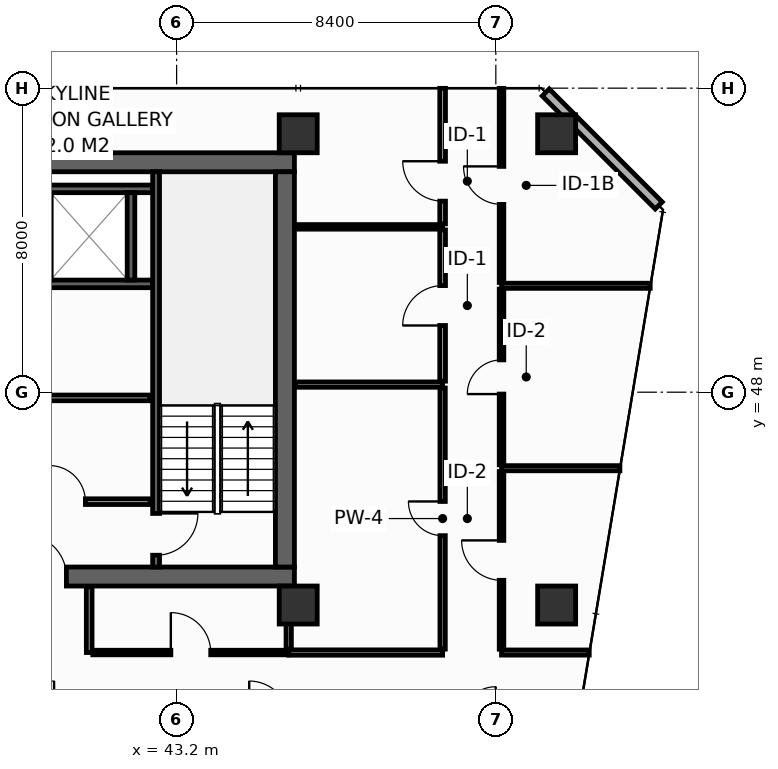
"""IFC4 building model, lengths in metres.
Left out: names, types, materials, properties, quantities, classifications, styles, units other than length and angle.
Written with IfcOpenShell. Run it as: python <this file> out.ifc"""

import sys

from ifc_helpers import new_model, si_unit, direction, frame, frame_2d, origin, origin_2d, place, context, subcontext, project, spatial, rectangle, hollow_rectangle, extrude, element, fill, save


model = new_model("IFC4")
c1 = context("Model", 3, precision=1e-05, world=origin(), true_north=direction((0.0, 1.0)))
c2 = subcontext(c1, "Body", "Model", "MODEL_VIEW")
j1 = project(units=[si_unit("LENGTHUNIT", "METRE"), si_unit("PLANEANGLEUNIT", "RADIAN")], contexts=[c1])
p1 = place(None, origin())
s1 = spatial("IfcSite", under=j1, at=p1, CompositionType="ELEMENT")
p2 = place(p1, origin())
s2 = spatial("IfcBuilding", under=s1, at=p2, CompositionType="ELEMENT")
p3 = place(p2, frame((0.0, 0.0, 156.2)))
s3 = spatial("IfcBuildingStorey", under=s2, at=p3, CompositionType="ELEMENT", Elevation=156.2)
p4 = place(p3, frame((13.6, 43.15, 0.0), z_axis=(0.0, 0.0, 1.0), x_axis=(1.0, 0.0, 0.0)))
e1 = element("IfcWall", 1, at=p4, inside=s3, PredefinedType="SHEAR", context=c2, shape_type="SweptSolid", body=[
    extrude(rectangle(XDim=32.7, YDim=0.5, at=frame_2d((16.35, 0.0))), origin(), (0.0, 0.0, 1.0), 3.55),
])
p5 = place(p4, frame((5.4, 0.0, 0.0)))
e2 = element("IfcOpeningElement", 2, at=p5, cuts=e1, PredefinedType="OPENING", context=c2, shape_type="SweptSolid", body=[
    extrude(rectangle(XDim=1.1, YDim=2.15, at=frame_2d((0.55, 1.075))), frame((0.0, 0.26, 0.0), z_axis=(0.0, -1.0, 0.0), x_axis=(1.0, 0.0, 0.0)), (0.0, 0.0, 1.0), 0.52),
])
p6 = place(p4, frame((25.6, 0.0, 0.0)))
e3 = element("IfcOpeningElement", 3, at=p6, cuts=e1, PredefinedType="OPENING", context=c2, shape_type="SweptSolid", body=[
    extrude(rectangle(XDim=1.1, YDim=2.15, at=frame_2d((0.55, 1.075))), frame((0.0, 0.26, 0.0), z_axis=(0.0, -1.0, 0.0), x_axis=(1.0, 0.0, 0.0)), (0.0, 0.0, 1.0), 0.52),
])
p7 = place(p3, frame((13.6, 54.05, 0.0), z_axis=(0.0, 0.0, 1.0), x_axis=(1.0, 0.0, 0.0)))
e4 = element("IfcWall", 4, at=p7, inside=s3, PredefinedType="SHEAR", context=c2, shape_type="SweptSolid", body=[
    extrude(rectangle(XDim=32.7, YDim=0.5, at=frame_2d((16.35, 0.0))), origin(), (0.0, 0.0, 1.0), 3.55),
])
p8 = place(p3, frame((46.05, 43.4, 0.0), z_axis=(0.0, 0.0, 1.0), x_axis=(0.0, 1.0, 0.0)))
e5 = element("IfcWall", 5, at=p8, inside=s3, PredefinedType="SHEAR", context=c2, shape_type="SweptSolid", body=[
    extrude(rectangle(XDim=10.4, YDim=0.5, at=frame_2d((5.2, 0.0))), origin(), (0.0, 0.0, 1.0), 3.55),
])
for number, where, z_axis, x_axis in (
    (6, (46.4, 54.8, 0.0), (0.0, 0.0, 1.0), (1.0, 0.0, 0.0)),
    (7, (53.2, 54.8, 0.0), (0.0, 0.0, 1.0), (1.0, 0.0, 0.0)),
    (8, (46.4, 42.4, 0.0), (0.0, 0.0, 1.0), (1.0, 0.0, 0.0)),
    (9, (53.2, 42.4, 0.0), (0.0, 0.0, 1.0), (1.0, 0.0, 0.0)),
):
    element("IfcColumn", number, at=place(p3, frame(where, z_axis=z_axis, x_axis=x_axis)), inside=s3, PredefinedType="COLUMN", context=c2, shape_type="SweptSolid", body=[
        extrude(hollow_rectangle(XDim=1.0, YDim=1.0, WallThickness=0.045, at=origin_2d()), origin(), (0.0, 0.0, 1.0), 3.8),
    ])
for number, where, z_axis, x_axis in (
    (10, (39.525, 50.85, 0.0), (0.0, 0.0, 1.0), (1.0, 0.0, 0.0)),
    (11, (39.525, 53.35, 0.0), (0.0, 0.0, 1.0), (1.0, 0.0, 0.0)),
):
    element("IfcWall", number, at=place(p3, frame(where, z_axis=z_axis, x_axis=x_axis)), inside=s3, PredefinedType="SHEAR", context=c2, shape_type="SweptSolid", body=[
        extrude(rectangle(XDim=3.045, YDim=0.2, at=frame_2d((1.522, 0.0))), origin(), (0.0, 0.0, 1.0), 3.55),
    ])
p9 = place(p3, frame((42.0, 50.95, 0.0), z_axis=(0.0, 0.0, 1.0), x_axis=(0.0, 1.0, 0.0)))
e12 = element("IfcWall", 12, at=p9, inside=s3, PredefinedType="SHEAR", context=c2, shape_type="SweptSolid", body=[
    extrude(rectangle(XDim=2.3, YDim=0.2, at=frame_2d((1.15, 0.0))), origin(), (0.0, 0.0, 1.0), 3.55),
])
p10 = place(p3, frame((42.66, 53.8, 0.0), z_axis=(0.0, 0.0, 1.0), x_axis=(0.0, -1.0, 0.0)))
e13 = element("IfcWall", 13, at=p10, inside=s3, PredefinedType="SHEAR", context=c2, shape_type="SweptSolid", body=[
    extrude(rectangle(XDim=10.4, YDim=0.18, at=frame_2d((5.2, 0.0))), origin(), (0.0, 0.0, 1.0), 3.55),
])
p11 = place(p10, frame((8.99, 0.0, 0.0)))
e14 = element("IfcOpeningElement", 14, at=p11, cuts=e13, PredefinedType="OPENING", context=c2, shape_type="SweptSolid", body=[
    extrude(rectangle(XDim=1.1, YDim=2.15, at=frame_2d((0.55, 1.075))), frame((0.0, 0.1, 0.0), z_axis=(0.0, -1.0, 0.0), x_axis=(1.0, 0.0, 0.0)), (0.0, 0.0, 1.0), 0.2),
])
p12 = place(p3, frame((34.05, 45.12, 0.0), z_axis=(0.0, 0.0, 1.0), x_axis=(1.0, 0.0, 0.0)))
e15 = element("IfcWall", 15, at=p12, inside=s3, PredefinedType="PARTITIONING", context=c2, shape_type="SweptSolid", body=[
    extrude(rectangle(XDim=8.45, YDim=0.15, at=frame_2d((4.225, 0.0))), origin(), (0.0, 0.0, 1.0), 3.55),
])
p13 = place(p12, frame((1.5, 0.0, 0.0)))
e16 = element("IfcOpeningElement", 16, at=p13, cuts=e15, PredefinedType="OPENING", context=c2, shape_type="SweptSolid", body=[
    extrude(rectangle(XDim=0.95, YDim=2.15, at=frame_2d((0.475, 1.075))), frame((0.0, 0.085, 0.0), z_axis=(0.0, -1.0, 0.0), x_axis=(1.0, 0.0, 0.0)), (0.0, 0.0, 1.0), 0.17),
])
p14 = place(p12, frame((5.8, 0.0, 0.0)))
e17 = element("IfcOpeningElement", 17, at=p14, cuts=e15, PredefinedType="OPENING", context=c2, shape_type="SweptSolid", body=[
    extrude(rectangle(XDim=0.95, YDim=2.15, at=frame_2d((0.475, 1.075))), frame((0.0, 0.085, 0.0), z_axis=(0.0, -1.0, 0.0), x_axis=(1.0, 0.0, 0.0)), (0.0, 0.0, 1.0), 0.17),
])
p15 = place(p3, frame((34.05, 47.85, 0.0), z_axis=(0.0, 0.0, 1.0), x_axis=(1.0, 0.0, 0.0)))
e18 = element("IfcWall", 18, at=p15, inside=s3, PredefinedType="PARTITIONING", context=c2, shape_type="SweptSolid", body=[
    extrude(rectangle(XDim=8.45, YDim=0.15, at=frame_2d((4.225, 0.0))), origin(), (0.0, 0.0, 1.0), 3.55),
])
p16 = place(p3, frame((55.887, 52.913, 0.0), z_axis=(0.0, 0.0, 1.0), x_axis=(-0.707106781187, 0.707106781187, 0.0)))
e19 = element("IfcWall", 19, at=p16, inside=s3, PredefinedType="STANDARD", context=c2, shape_type="SweptSolid", body=[
    extrude(rectangle(XDim=4.206, YDim=0.26, at=frame_2d((2.103, 0.0))), origin(), (0.0, 0.0, 1.0), 3.55),
])
p17 = place(p3, frame((46.15, 41.15, 0.0), z_axis=(0.0, 0.0, 1.0), x_axis=(1.0, 0.0, 0.0)))
e20 = element("IfcWall", 20, at=p17, inside=s3, PredefinedType="PARTITIONING", context=c2, shape_type="SweptSolid", body=[
    extrude(rectangle(XDim=4.05, YDim=0.14, at=frame_2d((2.025, 0.0))), origin(), (0.0, 0.0, 1.0), 3.55),
])
p18 = place(p3, frame((46.15, 41.24, 0.0), z_axis=(0.0, 0.0, 1.0), x_axis=(0.0, 1.0, 0.0)))
e21 = element("IfcWall", 21, at=p18, inside=s3, PredefinedType="PARTITIONING", context=c2, shape_type="SweptSolid", body=[
    extrude(rectangle(XDim=1.64, YDim=0.14, at=frame_2d((0.82, 0.0))), origin(), (0.0, 0.0, 1.0), 3.55),
])
p19 = place(p3, frame((46.32, 48.2, 0.0), z_axis=(0.0, 0.0, 1.0), x_axis=(1.0, 0.0, 0.0)))
e22 = element("IfcWall", 22, at=p19, inside=s3, PredefinedType="PARTITIONING", context=c2, shape_type="SweptSolid", body=[
    extrude(rectangle(XDim=3.88, YDim=0.14, at=frame_2d((1.94, 0.0))), origin(), (0.0, 0.0, 1.0), 3.55),
])
p20 = place(p3, frame((50.2, 41.24, 0.0), z_axis=(0.0, 0.0, 1.0), x_axis=(0.0, 1.0, 0.0)))
e23 = element("IfcWall", 23, at=p20, inside=s3, PredefinedType="PARTITIONING", context=c2, shape_type="SweptSolid", body=[
    extrude(rectangle(XDim=6.87, YDim=0.14, at=frame_2d((3.435, 0.0))), origin(), (0.0, 0.0, 1.0), 2.835),
])
p21 = place(p20, frame((2.985, 0.0, 0.0)))
e24 = element("IfcOpeningElement", 24, at=p21, cuts=e23, PredefinedType="OPENING", context=c2, shape_type="SweptSolid", body=[
    extrude(rectangle(XDim=0.9, YDim=2.1, at=frame_2d((0.45, 1.05))), frame((0.0, 0.08, 0.0), z_axis=(0.0, -1.0, 0.0), x_axis=(1.0, 0.0, 0.0)), (0.0, 0.0, 1.0), 0.16),
])
p22 = place(p3, frame((46.32, 52.35, 0.0), z_axis=(0.0, 0.0, 1.0), x_axis=(1.0, 0.0, 0.0)))
e25 = element("IfcWall", 25, at=p22, inside=s3, PredefinedType="PARTITIONING", context=c2, shape_type="SweptSolid", body=[
    extrude(rectangle(XDim=3.88, YDim=0.12, at=frame_2d((1.94, 0.0))), origin(), (0.0, 0.0, 1.0), 3.55),
])
p23 = place(p3, frame((50.2, 48.29, 0.0), z_axis=(0.0, 0.0, 1.0), x_axis=(0.0, 1.0, 0.0)))
e26 = element("IfcWall", 26, at=p23, inside=s3, PredefinedType="PARTITIONING", context=c2, shape_type="SweptSolid", body=[
    extrude(rectangle(XDim=3.98, YDim=0.15, at=frame_2d((1.99, 0.0))), origin(), (0.0, 0.0, 1.0), 3.55),
])
p24 = place(p23, frame((1.465, 0.0, 0.0)))
e27 = element("IfcOpeningElement", 27, at=p24, cuts=e26, PredefinedType="OPENING", context=c2, shape_type="SweptSolid", body=[
    extrude(rectangle(XDim=1.05, YDim=2.15, at=frame_2d((0.525, 1.075))), frame((0.0, 0.085, 0.0), z_axis=(0.0, -1.0, 0.0), x_axis=(1.0, 0.0, 0.0)), (0.0, 0.0, 1.0), 0.17),
])
p25 = place(p3, frame((50.2, 52.43, 0.0), z_axis=(0.0, 0.0, 1.0), x_axis=(0.0, 1.0, 0.0)))
e28 = element("IfcWall", 28, at=p25, inside=s3, PredefinedType="PARTITIONING", context=c2, shape_type="SweptSolid", body=[
    extrude(rectangle(XDim=3.565, YDim=0.15, at=frame_2d((1.783, 0.0))), origin(), (0.0, 0.0, 1.0), 2.935),
])
p26 = place(p25, frame((0.597, 0.0, 0.0)))
e29 = element("IfcOpeningElement", 29, at=p26, cuts=e28, PredefinedType="OPENING", context=c2, shape_type="SweptSolid", body=[
    extrude(rectangle(XDim=1.05, YDim=2.15, at=frame_2d((0.525, 1.075))), frame((0.0, 0.085, 0.0), z_axis=(0.0, -1.0, 0.0), x_axis=(1.0, 0.0, 0.0)), (0.0, 0.0, 1.0), 0.17),
])
p27 = place(p3, frame((51.75, 41.15, 0.0), z_axis=(0.0, 0.0, 1.0), x_axis=(1.0, 0.0, 0.0)))
e30 = element("IfcWall", 30, at=p27, inside=s3, PredefinedType="PARTITIONING", context=c2, shape_type="SweptSolid", body=[
    extrude(rectangle(XDim=2.308, YDim=0.135, at=frame_2d((1.154, 0.0))), origin(), (0.0, 0.0, 1.0), 3.035),
])
p28 = place(p3, frame((51.75, 46.0, 0.0), z_axis=(0.0, 0.0, 1.0), x_axis=(1.0, 0.0, 0.0)))
e31 = element("IfcWall", 31, at=p28, inside=s3, PredefinedType="PARTITIONING", context=c2, shape_type="SweptSolid", body=[
    extrude(rectangle(XDim=3.115, YDim=0.135, at=frame_2d((1.557, 0.0))), origin(), (0.0, 0.0, 1.0), 2.835),
])
p29 = place(p3, frame((51.75, 50.8, 0.0), z_axis=(0.0, 0.0, 1.0), x_axis=(1.0, 0.0, 0.0)))
e32 = element("IfcWall", 32, at=p29, inside=s3, PredefinedType="PARTITIONING", context=c2, shape_type="SweptSolid", body=[
    extrude(rectangle(XDim=3.912, YDim=0.135, at=frame_2d((1.956, 0.0))), origin(), (0.0, 0.0, 1.0), 2.835),
])
p30 = place(p3, frame((51.75, 41.238, 0.0), z_axis=(0.0, 0.0, 1.0), x_axis=(0.0, 1.0, 0.0)))
e33 = element("IfcWall", 33, at=p30, inside=s3, PredefinedType="PARTITIONING", context=c2, shape_type="SweptSolid", body=[
    extrude(rectangle(XDim=4.675, YDim=0.12, at=frame_2d((2.337, 0.0))), origin(), (0.0, 0.0, 1.0), 2.835),
])
p31 = place(p30, frame((1.813, 0.0, 0.0)))
e34 = element("IfcOpeningElement", 34, at=p31, cuts=e33, PredefinedType="OPENING", context=c2, shape_type="SweptSolid", body=[
    extrude(rectangle(XDim=1.05, YDim=2.15, at=frame_2d((0.525, 1.075))), frame((0.0, 0.07, 0.0), z_axis=(0.0, -1.0, 0.0), x_axis=(1.0, 0.0, 0.0)), (0.0, 0.0, 1.0), 0.14),
])
p32 = place(p3, frame((51.75, 46.087, 0.0), z_axis=(0.0, 0.0, 1.0), x_axis=(0.0, 1.0, 0.0)))
e35 = element("IfcWall", 35, at=p32, inside=s3, PredefinedType="PARTITIONING", context=c2, shape_type="SweptSolid", body=[
    extrude(rectangle(XDim=4.625, YDim=0.12, at=frame_2d((2.312, 0.0))), origin(), (0.0, 0.0, 1.0), 3.55),
])
p33 = place(p32, frame((1.863, 0.0, 0.0)))
e36 = element("IfcOpeningElement", 36, at=p33, cuts=e35, PredefinedType="OPENING", context=c2, shape_type="SweptSolid", body=[
    extrude(rectangle(XDim=0.9, YDim=2.1, at=frame_2d((0.45, 1.05))), frame((0.0, 0.07, 0.0), z_axis=(0.0, -1.0, 0.0), x_axis=(1.0, 0.0, 0.0)), (0.0, 0.0, 1.0), 0.14),
])
p34 = place(p3, frame((51.75, 50.887, 0.0), z_axis=(0.0, 0.0, 1.0), x_axis=(0.0, 1.0, 0.0)))
e37 = element("IfcWall", 37, at=p34, inside=s3, PredefinedType="PARTITIONING", context=c2, shape_type="SweptSolid", body=[
    extrude(rectangle(XDim=5.108, YDim=0.12, at=frame_2d((2.554, 0.0))), origin(), (0.0, 0.0, 1.0), 2.935),
])
p35 = place(p34, frame((2.054, 0.0, 0.0)))
e38 = element("IfcOpeningElement", 38, at=p35, cuts=e37, PredefinedType="OPENING", context=c2, shape_type="SweptSolid", body=[
    extrude(rectangle(XDim=1.0, YDim=2.15, at=frame_2d((0.5, 1.075))), frame((0.0, 0.07, 0.0), z_axis=(0.0, -1.0, 0.0), x_axis=(1.0, 0.0, 0.0)), (0.0, 0.0, 1.0), 0.14),
])
p36 = place(p3, frame((40.9, 41.15, 0.0), z_axis=(0.0, 0.0, 1.0), x_axis=(0.0, 1.0, 0.0)))
e39 = element("IfcWall", 39, at=p36, inside=s3, PredefinedType="PARTITIONING", context=c2, shape_type="SweptSolid", body=[
    extrude(rectangle(XDim=1.73, YDim=0.15, at=frame_2d((0.865, 0.0))), origin(), (0.0, 0.0, 1.0), 3.55),
])
p37 = place(p3, frame((40.995, 41.15, 0.0), z_axis=(0.0, 0.0, 1.0), x_axis=(1.0, 0.0, 0.0)))
e40 = element("IfcWall", 40, at=p37, inside=s3, PredefinedType="PARTITIONING", context=c2, shape_type="SweptSolid", body=[
    extrude(rectangle(XDim=5.155, YDim=0.12, at=frame_2d((2.577, 0.0))), origin(), (0.0, 0.0, 1.0), 3.55),
])
p38 = place(p37, frame((2.053, 0.0, 0.0)))
e41 = element("IfcOpeningElement", 41, at=p38, cuts=e40, PredefinedType="OPENING", context=c2, shape_type="SweptSolid", body=[
    extrude(rectangle(XDim=1.05, YDim=2.15, at=frame_2d((0.525, 1.075))), frame((0.0, 0.07, 0.0), z_axis=(0.0, -1.0, 0.0), x_axis=(1.0, 0.0, 0.0)), (0.0, 0.0, 1.0), 0.14),
])
p39 = place(p11, origin())
e42 = element("IfcDoor", 42, at=p39, inside=s3, OperationType="SINGLE_SWING_LEFT", PredefinedType="DOOR", context=c2, shape_type="SweptSolid", body=[
    extrude(rectangle(XDim=1.1, YDim=2.15, at=frame_2d((0.55, 1.075))), frame((0.0, 0.025, 0.0), z_axis=(0.0, -1.0, 0.0), x_axis=(1.0, 0.0, 0.0)), (0.0, 0.0, 1.0), 0.05),
])
fill(e14, e42)
p40 = place(p6, origin())
e43 = element("IfcDoor", 43, at=p40, inside=s3, OperationType="SINGLE_SWING_LEFT", PredefinedType="DOOR", context=c2, shape_type="SweptSolid", body=[
    extrude(rectangle(XDim=1.1, YDim=2.15, at=frame_2d((0.55, 1.075))), frame((0.0, 0.025, 0.0), z_axis=(0.0, -1.0, 0.0), x_axis=(1.0, 0.0, 0.0)), (0.0, 0.0, 1.0), 0.05),
])
fill(e3, e43)
p41 = place(p14, origin())
e44 = element("IfcDoor", 44, at=p41, inside=s3, OperationType="SINGLE_SWING_LEFT", PredefinedType="DOOR", context=c2, shape_type="SweptSolid", body=[
    extrude(rectangle(XDim=0.95, YDim=2.15, at=frame_2d((0.475, 1.075))), frame((0.0, 0.025, 0.0), z_axis=(0.0, -1.0, 0.0), x_axis=(1.0, 0.0, 0.0)), (0.0, 0.0, 1.0), 0.05),
])
fill(e17, e44)
p42 = place(p21, origin())
e45 = element("IfcDoor", 45, at=p42, inside=s3, OperationType="SINGLE_SWING_RIGHT", PredefinedType="DOOR", context=c2, shape_type="SweptSolid", body=[
    extrude(rectangle(XDim=0.9, YDim=2.1, at=frame_2d((0.45, 1.05))), frame((0.0, 0.025, 0.0), z_axis=(0.0, -1.0, 0.0), x_axis=(1.0, 0.0, 0.0)), (0.0, 0.0, 1.0), 0.05),
])
fill(e24, e45)
p43 = place(p24, origin())
e46 = element("IfcDoor", 46, at=p43, inside=s3, OperationType="SINGLE_SWING_LEFT", PredefinedType="DOOR", context=c2, shape_type="SweptSolid", body=[
    extrude(rectangle(XDim=1.05, YDim=2.15, at=frame_2d((0.525, 1.075))), frame((0.0, 0.025, 0.0), z_axis=(0.0, -1.0, 0.0), x_axis=(1.0, 0.0, 0.0)), (0.0, 0.0, 1.0), 0.05),
])
fill(e27, e46)
p44 = place(p26, origin())
e47 = element("IfcDoor", 47, at=p44, inside=s3, OperationType="SINGLE_SWING_RIGHT", PredefinedType="DOOR", context=c2, shape_type="SweptSolid", body=[
    extrude(rectangle(XDim=1.05, YDim=2.15, at=frame_2d((0.525, 1.075))), frame((0.0, 0.025, 0.0), z_axis=(0.0, -1.0, 0.0), x_axis=(1.0, 0.0, 0.0)), (0.0, 0.0, 1.0), 0.05),
])
fill(e29, e47)
p45 = place(p31, origin())
e48 = element("IfcDoor", 48, at=p45, inside=s3, OperationType="SINGLE_SWING_RIGHT", PredefinedType="DOOR", context=c2, shape_type="SweptSolid", body=[
    extrude(rectangle(XDim=1.05, YDim=2.15, at=frame_2d((0.525, 1.075))), frame((0.0, 0.025, 0.0), z_axis=(0.0, -1.0, 0.0), x_axis=(1.0, 0.0, 0.0)), (0.0, 0.0, 1.0), 0.05),
])
fill(e34, e48)
p46 = place(p33, origin())
e49 = element("IfcDoor", 49, at=p46, inside=s3, OperationType="SINGLE_SWING_LEFT", PredefinedType="DOOR", context=c2, shape_type="SweptSolid", body=[
    extrude(rectangle(XDim=0.9, YDim=2.1, at=frame_2d((0.45, 1.05))), frame((0.0, 0.025, 0.0), z_axis=(0.0, -1.0, 0.0), x_axis=(1.0, 0.0, 0.0)), (0.0, 0.0, 1.0), 0.05),
])
fill(e36, e49)
p47 = place(p35, origin())
e50 = element("IfcDoor", 50, at=p47, inside=s3, OperationType="SINGLE_SWING_RIGHT", PredefinedType="DOOR", context=c2, shape_type="SweptSolid", body=[
    extrude(rectangle(XDim=1.0, YDim=2.15, at=frame_2d((0.5, 1.075))), frame((0.0, 0.025, 0.0), z_axis=(0.0, -1.0, 0.0), x_axis=(1.0, 0.0, 0.0)), (0.0, 0.0, 1.0), 0.05),
])
fill(e38, e50)
p48 = place(p38, origin())
e51 = element("IfcDoor", 51, at=p48, inside=s3, OperationType="SINGLE_SWING_LEFT", PredefinedType="DOOR", context=c2, shape_type="SweptSolid", body=[
    extrude(rectangle(XDim=1.05, YDim=2.15, at=frame_2d((0.525, 1.075))), frame((0.0, 0.025, 0.0), z_axis=(0.0, -1.0, 0.0), x_axis=(1.0, 0.0, 0.0)), (0.0, 0.0, 1.0), 0.05),
])
fill(e41, e51)
save(model, sys.argv[1])
